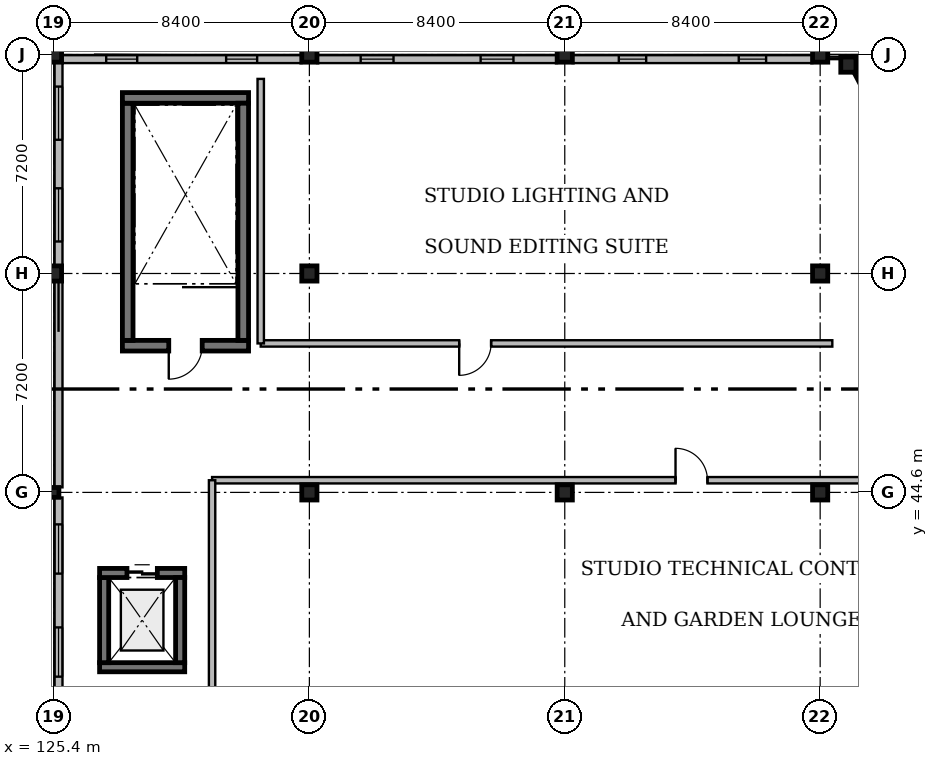
"""IFC4 building model, lengths in metres.
Left out: names, types, materials, properties, quantities, classifications, styles, units other than length and angle.
Written with IfcOpenShell. Run it as: python <this file> out.ifc"""

import sys

from ifc_helpers import new_model, si_unit, direction, frame, frame_2d, origin, origin_2d, place, context, subcontext, project, spatial, rectangle, hollow_circle, extrude, element, fill, save


model = new_model("IFC4")
c1 = context("Model", 3, precision=1e-05, world=origin(), true_north=direction((0.0, 1.0)))
c2 = subcontext(c1, "Body", "Model", "MODEL_VIEW")
j1 = project(units=[si_unit("LENGTHUNIT", "METRE"), si_unit("PLANEANGLEUNIT", "RADIAN")], contexts=[c1])
p1 = place(None, origin())
s1 = spatial("IfcSite", under=j1, at=p1, CompositionType="ELEMENT")
p2 = place(p1, origin())
s2 = spatial("IfcBuilding", under=s1, at=p2, CompositionType="ELEMENT")
p3 = place(p2, frame((0.0, 0.0, 9.0)))
s3 = spatial("IfcBuildingStorey", under=s2, at=p3, CompositionType="ELEMENT", Elevation=9.0)
p4 = place(p3, frame((125.4, 44.6, 0.0), z_axis=(0.0, 0.0, 1.0), x_axis=(1.0, 0.0, 0.0)))
e1 = element("IfcColumn", 1, at=p4, inside=s3, PredefinedType="COLUMN", context=c2, shape_type="SweptSolid", body=[
    extrude(hollow_circle(Radius=0.162, WallThickness=0.012, at=origin_2d()), origin(), (0.0, 0.0, 1.0), 4.06),
])
for number, where, z_axis, x_axis in (
    (2, (125.4, 51.8, 0.0), (0.0, 0.0, 1.0), (1.0, 0.0, 0.0)),
    (3, (125.4, 59.0, 0.0), (0.0, 0.0, 1.0), (1.0, 0.0, 0.0)),
    (4, (133.8, 44.6, 0.0), (0.0, 0.0, 1.0), (1.0, 0.0, 0.0)),
    (5, (133.8, 51.8, 0.0), (0.0, 0.0, 1.0), (1.0, 0.0, 0.0)),
    (6, (133.8, 59.0, 0.0), (0.0, 0.0, 1.0), (1.0, 0.0, 0.0)),
    (7, (142.2, 44.6, 0.0), (0.0, 0.0, 1.0), (1.0, 0.0, 0.0)),
    (8, (142.2, 59.0, 0.0), (0.0, 0.0, 1.0), (1.0, 0.0, 0.0)),
    (9, (150.6, 44.6, 0.0), (0.0, 0.0, 1.0), (1.0, 0.0, 0.0)),
    (10, (150.6, 51.8, 0.0), (0.0, 0.0, 1.0), (1.0, 0.0, 0.0)),
    (11, (150.6, 59.0, 0.0), (0.0, 0.0, 1.0), (1.0, 0.0, 0.0)),
):
    element("IfcColumn", number, at=place(p3, frame(where, z_axis=z_axis, x_axis=x_axis)), inside=s3, PredefinedType="COLUMN", context=c2, shape_type="SweptSolid", body=[
        extrude(rectangle(XDim=0.5, YDim=0.5, at=origin_2d()), origin(), (0.0, 0.0, 1.0), 4.06),
    ])
p5 = place(p3, frame((151.528, 58.669, 0.0), z_axis=(0.0, 0.0, 1.0), x_axis=(1.0, 0.0, 0.0)))
e12 = element("IfcColumn", 12, at=p5, inside=s3, PredefinedType="COLUMN", context=c2, shape_type="SweptSolid", body=[
    extrude(rectangle(XDim=0.5, YDim=0.5, at=origin_2d()), origin(), (0.0, 0.0, 1.0), 4.18),
])
p6 = place(p3, frame((131.8, 49.425, 0.0), z_axis=(0.0, 0.0, 1.0), x_axis=(-1.0, 0.0, 0.0)))
e13 = element("IfcWall", 13, at=p6, inside=s3, PredefinedType="SOLIDWALL", context=c2, shape_type="SweptSolid", body=[
    extrude(rectangle(XDim=4.15, YDim=0.35, at=frame_2d((2.075, 0.0))), origin(), (0.0, 0.0, 1.0), 4.0),
])
p7 = place(p6, frame((1.525, 0.0, 0.0)))
e14 = element("IfcOpeningElement", 14, at=p7, cuts=e13, PredefinedType="OPENING", context=c2, shape_type="SweptSolid", body=[
    extrude(rectangle(XDim=1.1, YDim=2.15, at=frame_2d((0.55, 1.075))), frame((0.0, 0.195, 0.0), z_axis=(0.0, -1.0, 0.0), x_axis=(1.0, 0.0, 0.0)), (0.0, 0.0, 1.0), 0.39),
])
p8 = place(p3, frame((127.825, 49.6, 0.0), z_axis=(0.0, 0.0, 1.0), x_axis=(0.0, 1.0, 0.0)))
e15 = element("IfcWall", 15, at=p8, inside=s3, PredefinedType="SOLIDWALL", context=c2, shape_type="SweptSolid", body=[
    extrude(rectangle(XDim=7.8, YDim=0.35, at=frame_2d((3.9, 0.0))), origin(), (0.0, 0.0, 1.0), 4.0),
])
p9 = place(p3, frame((127.65, 57.575, 0.0), z_axis=(0.0, 0.0, 1.0), x_axis=(1.0, 0.0, 0.0)))
e16 = element("IfcWall", 16, at=p9, inside=s3, PredefinedType="SOLIDWALL", context=c2, shape_type="SweptSolid", body=[
    extrude(rectangle(XDim=4.15, YDim=0.35, at=frame_2d((2.075, 0.0))), origin(), (0.0, 0.0, 1.0), 4.0),
])
p10 = place(p3, frame((131.625, 57.4, 0.0), z_axis=(0.0, 0.0, 1.0), x_axis=(0.0, -1.0, 0.0)))
e17 = element("IfcWall", 17, at=p10, inside=s3, PredefinedType="SOLIDWALL", context=c2, shape_type="SweptSolid", body=[
    extrude(rectangle(XDim=7.8, YDim=0.35, at=frame_2d((3.9, 0.0))), origin(), (0.0, 0.0, 1.0), 4.0),
])
for number, where, z_axis, x_axis in (
    (18, (129.7, 38.85, 0.0), (0.0, 0.0, 1.0), (-1.0, 0.0, 0.0)),
    (19, (127.05, 39.0, 0.0), (0.0, 0.0, 1.0), (0.0, 1.0, 0.0)),
):
    element("IfcWall", number, at=place(p3, frame(where, z_axis=z_axis, x_axis=x_axis)), inside=s3, PredefinedType="SOLIDWALL", context=c2, shape_type="SweptSolid", body=[
        extrude(rectangle(XDim=2.8, YDim=0.3, at=frame_2d((1.4, 0.0))), origin(), (0.0, 0.0, 1.0), 4.0),
    ])
p11 = place(p3, frame((126.9, 41.95, 0.0), z_axis=(0.0, 0.0, 1.0), x_axis=(1.0, 0.0, 0.0)))
e20 = element("IfcWall", 20, at=p11, inside=s3, PredefinedType="SOLIDWALL", context=c2, shape_type="SweptSolid", body=[
    extrude(rectangle(XDim=2.8, YDim=0.3, at=frame_2d((1.4, 0.0))), origin(), (0.0, 0.0, 1.0), 4.0),
])
p12 = place(p11, frame((0.9, 0.0, 0.0)))
e21 = element("IfcOpeningElement", 21, at=p12, cuts=e20, PredefinedType="OPENING", context=c2, shape_type="SweptSolid", body=[
    extrude(rectangle(XDim=1.0, YDim=2.15, at=frame_2d((0.5, 1.075))), frame((0.0, 0.17, 0.0), z_axis=(0.0, -1.0, 0.0), x_axis=(1.0, 0.0, 0.0)), (0.0, 0.0, 1.0), 0.34),
])
p13 = place(p3, frame((129.55, 41.8, 0.0), z_axis=(0.0, 0.0, 1.0), x_axis=(0.0, -1.0, 0.0)))
e22 = element("IfcWall", 22, at=p13, inside=s3, PredefinedType="SOLIDWALL", context=c2, shape_type="SweptSolid", body=[
    extrude(rectangle(XDim=2.8, YDim=0.3, at=frame_2d((1.4, 0.0))), origin(), (0.0, 0.0, 1.0), 4.0),
])
p14 = place(p3, frame((125.655, 58.85, 0.0), z_axis=(0.0, 0.0, 1.0), x_axis=(1.0, 0.0, 0.0)))
e23 = element("IfcWall", 23, at=p14, inside=s3, PredefinedType="SOLIDWALL", context=c2, shape_type="SweptSolid", body=[
    extrude(rectangle(XDim=7.89, YDim=0.26, at=frame_2d((3.945, 0.0))), origin(), (0.0, 0.0, 1.0), 3.293),
])
p15 = place(p14, frame((1.462, 0.0, 0.95)))
e24 = element("IfcOpeningElement", 24, at=p15, cuts=e23, PredefinedType="OPENING", context=c2, shape_type="SweptSolid", body=[
    extrude(rectangle(XDim=1.02, YDim=1.55, at=frame_2d((0.51, 0.775))), frame((0.0, 0.15, 0.0), z_axis=(0.0, -1.0, 0.0), x_axis=(1.0, 0.0, 0.0)), (0.0, 0.0, 1.0), 0.3),
])
p16 = place(p14, frame((5.407, 0.0, 0.95)))
e25 = element("IfcOpeningElement", 25, at=p16, cuts=e23, PredefinedType="OPENING", context=c2, shape_type="SweptSolid", body=[
    extrude(rectangle(XDim=1.02, YDim=1.55, at=frame_2d((0.51, 0.775))), frame((0.0, 0.15, 0.0), z_axis=(0.0, -1.0, 0.0), x_axis=(1.0, 0.0, 0.0)), (0.0, 0.0, 1.0), 0.3),
])
p17 = place(p3, frame((134.055, 58.85, 0.0), z_axis=(0.0, 0.0, 1.0), x_axis=(1.0, 0.0, 0.0)))
e26 = element("IfcWall", 26, at=p17, inside=s3, PredefinedType="SOLIDWALL", context=c2, shape_type="SweptSolid", body=[
    extrude(rectangle(XDim=7.89, YDim=0.26, at=frame_2d((3.945, 0.0))), origin(), (0.0, 0.0, 1.0), 3.293),
])
p18 = place(p17, frame((1.433, 0.0, 0.95)))
e27 = element("IfcOpeningElement", 27, at=p18, cuts=e26, PredefinedType="OPENING", context=c2, shape_type="SweptSolid", body=[
    extrude(rectangle(XDim=1.08, YDim=1.6, at=frame_2d((0.54, 0.8))), frame((0.0, 0.15, 0.0), z_axis=(0.0, -1.0, 0.0), x_axis=(1.0, 0.0, 0.0)), (0.0, 0.0, 1.0), 0.3),
])
p19 = place(p17, frame((5.377, 0.0, 0.95)))
e28 = element("IfcOpeningElement", 28, at=p19, cuts=e26, PredefinedType="OPENING", context=c2, shape_type="SweptSolid", body=[
    extrude(rectangle(XDim=1.08, YDim=1.6, at=frame_2d((0.54, 0.8))), frame((0.0, 0.15, 0.0), z_axis=(0.0, -1.0, 0.0), x_axis=(1.0, 0.0, 0.0)), (0.0, 0.0, 1.0), 0.3),
])
p20 = place(p3, frame((142.455, 58.85, 0.0), z_axis=(0.0, 0.0, 1.0), x_axis=(1.0, 0.0, 0.0)))
e29 = element("IfcWall", 29, at=p20, inside=s3, PredefinedType="SOLIDWALL", context=c2, shape_type="SweptSolid", body=[
    extrude(rectangle(XDim=7.89, YDim=0.26, at=frame_2d((3.945, 0.0))), origin(), (0.0, 0.0, 1.0), 3.293),
])
p21 = place(p20, frame((1.522, 0.0, 0.95)))
e30 = element("IfcOpeningElement", 30, at=p21, cuts=e29, PredefinedType="OPENING", context=c2, shape_type="SweptSolid", body=[
    extrude(rectangle(XDim=0.9, YDim=1.7, at=frame_2d((0.45, 0.85))), frame((0.0, 0.15, 0.0), z_axis=(0.0, -1.0, 0.0), x_axis=(1.0, 0.0, 0.0)), (0.0, 0.0, 1.0), 0.3),
])
p22 = place(p20, frame((5.468, 0.0, 0.95)))
e31 = element("IfcOpeningElement", 31, at=p22, cuts=e29, PredefinedType="OPENING", context=c2, shape_type="SweptSolid", body=[
    extrude(rectangle(XDim=0.9, YDim=1.7, at=frame_2d((0.45, 0.85))), frame((0.0, 0.15, 0.0), z_axis=(0.0, -1.0, 0.0), x_axis=(1.0, 0.0, 0.0)), (0.0, 0.0, 1.0), 0.3),
])
p23 = place(p3, frame((125.55, 37.655, 0.0), z_axis=(0.0, 0.0, 1.0), x_axis=(0.0, 1.0, 0.0)))
e32 = element("IfcWall", 32, at=p23, inside=s3, PredefinedType="SOLIDWALL", context=c2, shape_type="SweptSolid", body=[
    extrude(rectangle(XDim=6.778, YDim=0.26, at=frame_2d((3.389, 0.0))), origin(), (0.0, 0.0, 1.0), 3.673),
])
p24 = place(p23, frame((0.885, 0.0, 0.95)))
e33 = element("IfcOpeningElement", 33, at=p24, cuts=e32, PredefinedType="OPENING", context=c2, shape_type="SweptSolid", body=[
    extrude(rectangle(XDim=1.62, YDim=1.75, at=frame_2d((0.81, 0.875))), frame((0.0, 0.15, 0.0), z_axis=(0.0, -1.0, 0.0), x_axis=(1.0, 0.0, 0.0)), (0.0, 0.0, 1.0), 0.3),
])
p25 = place(p23, frame((4.274, 0.0, 0.95)))
e34 = element("IfcOpeningElement", 34, at=p25, cuts=e32, PredefinedType="OPENING", context=c2, shape_type="SweptSolid", body=[
    extrude(rectangle(XDim=1.62, YDim=1.75, at=frame_2d((0.81, 0.875))), frame((0.0, 0.15, 0.0), z_axis=(0.0, -1.0, 0.0), x_axis=(1.0, 0.0, 0.0)), (0.0, 0.0, 1.0), 0.3),
])
p26 = place(p3, frame((125.55, 44.767, 0.0), z_axis=(0.0, 0.0, 1.0), x_axis=(0.0, 1.0, 0.0)))
e35 = element("IfcWall", 35, at=p26, inside=s3, PredefinedType="SOLIDWALL", context=c2, shape_type="SweptSolid", body=[
    extrude(rectangle(XDim=6.778, YDim=0.26, at=frame_2d((3.389, 0.0))), origin(), (0.0, 0.0, 1.0), 0.785),
])
p27 = place(p3, frame((125.55, 52.055, 0.0), z_axis=(0.0, 0.0, 1.0), x_axis=(0.0, 1.0, 0.0)))
e36 = element("IfcWall", 36, at=p27, inside=s3, PredefinedType="SOLIDWALL", context=c2, shape_type="SweptSolid", body=[
    extrude(rectangle(XDim=6.69, YDim=0.26, at=frame_2d((3.345, 0.0))), origin(), (0.0, 0.0, 1.0), 3.673),
])
p28 = place(p27, frame((0.798, 0.0, 0.95)))
e37 = element("IfcOpeningElement", 37, at=p28, cuts=e36, PredefinedType="OPENING", context=c2, shape_type="SweptSolid", body=[
    extrude(rectangle(XDim=1.75, YDim=1.65, at=frame_2d((0.875, 0.825))), frame((0.0, 0.15, 0.0), z_axis=(0.0, -1.0, 0.0), x_axis=(1.0, 0.0, 0.0)), (0.0, 0.0, 1.0), 0.3),
])
p29 = place(p27, frame((4.143, 0.0, 0.95)))
e38 = element("IfcOpeningElement", 38, at=p29, cuts=e36, PredefinedType="OPENING", context=c2, shape_type="SweptSolid", body=[
    extrude(rectangle(XDim=1.75, YDim=1.65, at=frame_2d((0.875, 0.825))), frame((0.0, 0.15, 0.0), z_axis=(0.0, -1.0, 0.0), x_axis=(1.0, 0.0, 0.0)), (0.0, 0.0, 1.0), 0.3),
])
p30 = place(p3, frame((151.763, 58.73, 0.0), z_axis=(0.0, 0.0, 1.0), x_axis=(0.463702805056, -0.88599080615, 0.0)))
e39 = element("IfcWall", 39, at=p30, inside=s3, PredefinedType="SOLIDWALL", context=c2, shape_type="SweptSolid", body=[
    extrude(rectangle(XDim=4.439, YDim=0.38, at=frame_2d((2.219, 0.0))), origin(), (0.0, 0.0, 1.0), 4.24),
])
p31 = place(p30, frame((1.357, 0.0, 0.95)))
e40 = element("IfcOpeningElement", 40, at=p31, cuts=e39, PredefinedType="OPENING", context=c2, shape_type="SweptSolid", body=[
    extrude(rectangle(XDim=1.75, YDim=1.65, at=frame_2d((0.875, 0.825))), frame((0.0, 0.21, 0.0), z_axis=(0.0, -1.0, 0.0), x_axis=(1.0, 0.0, 0.0)), (0.0, 0.0, 1.0), 0.42),
])
p32 = place(p3, frame((130.6, 45.0, 0.0), z_axis=(0.0, 0.0, 1.0), x_axis=(1.0, 0.0, 0.0)))
e41 = element("IfcWall", 41, at=p32, inside=s3, PredefinedType="PARTITIONING", context=c2, shape_type="SweptSolid", body=[
    extrude(rectangle(XDim=22.6, YDim=0.21, at=frame_2d((11.3, 0.0))), origin(), (0.0, 0.0, 1.0), 3.96),
])
p33 = place(p32, frame((15.243, 0.0, 0.0)))
e42 = element("IfcOpeningElement", 42, at=p33, cuts=e41, PredefinedType="OPENING", context=c2, shape_type="SweptSolid", body=[
    extrude(rectangle(XDim=1.05, YDim=2.15, at=frame_2d((0.525, 1.075))), frame((0.0, 0.125, 0.0), z_axis=(0.0, -1.0, 0.0), x_axis=(1.0, 0.0, 0.0)), (0.0, 0.0, 1.0), 0.25),
])
p34 = place(p3, frame((130.6, 38.0, 0.0), z_axis=(0.0, 0.0, 1.0), x_axis=(0.0, 1.0, 0.0)))
e43 = element("IfcWall", 43, at=p34, inside=s3, PredefinedType="PARTITIONING", context=c2, shape_type="SweptSolid", body=[
    extrude(rectangle(XDim=7.0, YDim=0.21, at=frame_2d((3.5, 0.0))), origin(), (0.0, 0.0, 1.0), 3.96),
])
p35 = place(p3, frame((151.0, 49.5, 0.0), z_axis=(0.0, 0.0, 1.0), x_axis=(-1.0, 0.0, 0.0)))
e44 = element("IfcWall", 44, at=p35, inside=s3, PredefinedType="PARTITIONING", context=c2, shape_type="SweptSolid", body=[
    extrude(rectangle(XDim=18.8, YDim=0.21, at=frame_2d((9.4, 0.0))), origin(), (0.0, 0.0, 1.0), 3.96),
])
p36 = place(p35, frame((11.222, 0.0, 0.0)))
e45 = element("IfcOpeningElement", 45, at=p36, cuts=e44, PredefinedType="OPENING", context=c2, shape_type="SweptSolid", body=[
    extrude(rectangle(XDim=1.05, YDim=2.15, at=frame_2d((0.525, 1.075))), frame((0.0, 0.125, 0.0), z_axis=(0.0, -1.0, 0.0), x_axis=(1.0, 0.0, 0.0)), (0.0, 0.0, 1.0), 0.25),
])
p37 = place(p3, frame((132.2, 49.5, 0.0), z_axis=(0.0, 0.0, 1.0), x_axis=(0.0, 1.0, 0.0)))
e46 = element("IfcWall", 46, at=p37, inside=s3, PredefinedType="PARTITIONING", context=c2, shape_type="SweptSolid", body=[
    extrude(rectangle(XDim=8.7, YDim=0.21, at=frame_2d((4.35, 0.0))), origin(), (0.0, 0.0, 1.0), 3.96),
])
p38 = place(p7, origin())
e47 = element("IfcDoor", 47, at=p38, inside=s3, OperationType="SINGLE_SWING_RIGHT", PredefinedType="DOOR", context=c2, shape_type="SweptSolid", body=[
    extrude(rectangle(XDim=1.1, YDim=2.15, at=frame_2d((0.55, 1.075))), frame((0.0, 0.025, 0.0), z_axis=(0.0, -1.0, 0.0), x_axis=(1.0, 0.0, 0.0)), (0.0, 0.0, 1.0), 0.05),
])
fill(e14, e47)
p39 = place(p12, origin())
e48 = element("IfcDoor", 48, at=p39, inside=s3, OperationType="DOUBLE_DOOR_SLIDING", PredefinedType="DOOR", context=c2, shape_type="SweptSolid", body=[
    extrude(rectangle(XDim=1.0, YDim=2.15, at=frame_2d((0.5, 1.075))), frame((0.0, 0.025, 0.0), z_axis=(0.0, -1.0, 0.0), x_axis=(1.0, 0.0, 0.0)), (0.0, 0.0, 1.0), 0.05),
])
fill(e21, e48)
p40 = place(p15, origin())
e49 = element("IfcWindow", 49, at=p40, inside=s3, PartitioningType="SINGLE_PANEL", PredefinedType="WINDOW", context=c2, shape_type="SweptSolid", body=[
    extrude(rectangle(XDim=1.02, YDim=1.55, at=frame_2d((0.51, 0.775))), frame((0.0, 0.03, 0.0), z_axis=(0.0, -1.0, 0.0), x_axis=(1.0, 0.0, 0.0)), (0.0, 0.0, 1.0), 0.06),
])
fill(e24, e49)
p41 = place(p16, origin())
e50 = element("IfcWindow", 50, at=p41, inside=s3, PartitioningType="SINGLE_PANEL", PredefinedType="WINDOW", context=c2, shape_type="SweptSolid", body=[
    extrude(rectangle(XDim=1.02, YDim=1.55, at=frame_2d((0.51, 0.775))), frame((0.0, 0.03, 0.0), z_axis=(0.0, -1.0, 0.0), x_axis=(1.0, 0.0, 0.0)), (0.0, 0.0, 1.0), 0.06),
])
fill(e25, e50)
p42 = place(p18, origin())
e51 = element("IfcWindow", 51, at=p42, inside=s3, PartitioningType="SINGLE_PANEL", PredefinedType="WINDOW", context=c2, shape_type="SweptSolid", body=[
    extrude(rectangle(XDim=1.08, YDim=1.6, at=frame_2d((0.54, 0.8))), frame((0.0, 0.03, 0.0), z_axis=(0.0, -1.0, 0.0), x_axis=(1.0, 0.0, 0.0)), (0.0, 0.0, 1.0), 0.06),
])
fill(e27, e51)
p43 = place(p19, origin())
e52 = element("IfcWindow", 52, at=p43, inside=s3, PartitioningType="SINGLE_PANEL", PredefinedType="WINDOW", context=c2, shape_type="SweptSolid", body=[
    extrude(rectangle(XDim=1.08, YDim=1.6, at=frame_2d((0.54, 0.8))), frame((0.0, 0.03, 0.0), z_axis=(0.0, -1.0, 0.0), x_axis=(1.0, 0.0, 0.0)), (0.0, 0.0, 1.0), 0.06),
])
fill(e28, e52)
p44 = place(p21, origin())
e53 = element("IfcWindow", 53, at=p44, inside=s3, PartitioningType="SINGLE_PANEL", PredefinedType="WINDOW", context=c2, shape_type="SweptSolid", body=[
    extrude(rectangle(XDim=0.9, YDim=1.7, at=frame_2d((0.45, 0.85))), frame((0.0, 0.03, 0.0), z_axis=(0.0, -1.0, 0.0), x_axis=(1.0, 0.0, 0.0)), (0.0, 0.0, 1.0), 0.06),
])
fill(e30, e53)
p45 = place(p22, origin())
e54 = element("IfcWindow", 54, at=p45, inside=s3, PartitioningType="SINGLE_PANEL", PredefinedType="WINDOW", context=c2, shape_type="SweptSolid", body=[
    extrude(rectangle(XDim=0.9, YDim=1.7, at=frame_2d((0.45, 0.85))), frame((0.0, 0.03, 0.0), z_axis=(0.0, -1.0, 0.0), x_axis=(1.0, 0.0, 0.0)), (0.0, 0.0, 1.0), 0.06),
])
fill(e31, e54)
p46 = place(p24, origin())
e55 = element("IfcWindow", 55, at=p46, inside=s3, PartitioningType="SINGLE_PANEL", PredefinedType="WINDOW", context=c2, shape_type="SweptSolid", body=[
    extrude(rectangle(XDim=1.62, YDim=1.75, at=frame_2d((0.81, 0.875))), frame((0.0, 0.03, 0.0), z_axis=(0.0, -1.0, 0.0), x_axis=(1.0, 0.0, 0.0)), (0.0, 0.0, 1.0), 0.06),
])
fill(e33, e55)
p47 = place(p25, origin())
e56 = element("IfcWindow", 56, at=p47, inside=s3, PartitioningType="SINGLE_PANEL", PredefinedType="WINDOW", context=c2, shape_type="SweptSolid", body=[
    extrude(rectangle(XDim=1.62, YDim=1.75, at=frame_2d((0.81, 0.875))), frame((0.0, 0.03, 0.0), z_axis=(0.0, -1.0, 0.0), x_axis=(1.0, 0.0, 0.0)), (0.0, 0.0, 1.0), 0.06),
])
fill(e34, e56)
p48 = place(p28, origin())
e57 = element("IfcWindow", 57, at=p48, inside=s3, PartitioningType="SINGLE_PANEL", PredefinedType="WINDOW", context=c2, shape_type="SweptSolid", body=[
    extrude(rectangle(XDim=1.75, YDim=1.65, at=frame_2d((0.875, 0.825))), frame((0.0, 0.03, 0.0), z_axis=(0.0, -1.0, 0.0), x_axis=(1.0, 0.0, 0.0)), (0.0, 0.0, 1.0), 0.06),
])
fill(e37, e57)
p49 = place(p29, origin())
e58 = element("IfcWindow", 58, at=p49, inside=s3, PartitioningType="SINGLE_PANEL", PredefinedType="WINDOW", context=c2, shape_type="SweptSolid", body=[
    extrude(rectangle(XDim=1.75, YDim=1.65, at=frame_2d((0.875, 0.825))), frame((0.0, 0.03, 0.0), z_axis=(0.0, -1.0, 0.0), x_axis=(1.0, 0.0, 0.0)), (0.0, 0.0, 1.0), 0.06),
])
fill(e38, e58)
p50 = place(p33, origin())
e59 = element("IfcDoor", 59, at=p50, inside=s3, OperationType="SINGLE_SWING_LEFT", PredefinedType="DOOR", context=c2, shape_type="SweptSolid", body=[
    extrude(rectangle(XDim=1.05, YDim=2.15, at=frame_2d((0.525, 1.075))), frame((0.0, 0.025, 0.0), z_axis=(0.0, -1.0, 0.0), x_axis=(1.0, 0.0, 0.0)), (0.0, 0.0, 1.0), 0.05),
])
fill(e42, e59)
p51 = place(p36, origin())
e60 = element("IfcDoor", 60, at=p51, inside=s3, OperationType="SINGLE_SWING_RIGHT", PredefinedType="DOOR", context=c2, shape_type="SweptSolid", body=[
    extrude(rectangle(XDim=1.05, YDim=2.15, at=frame_2d((0.525, 1.075))), frame((0.0, 0.025, 0.0), z_axis=(0.0, -1.0, 0.0), x_axis=(1.0, 0.0, 0.0)), (0.0, 0.0, 1.0), 0.05),
])
fill(e45, e60)
save(model, sys.argv[1])
